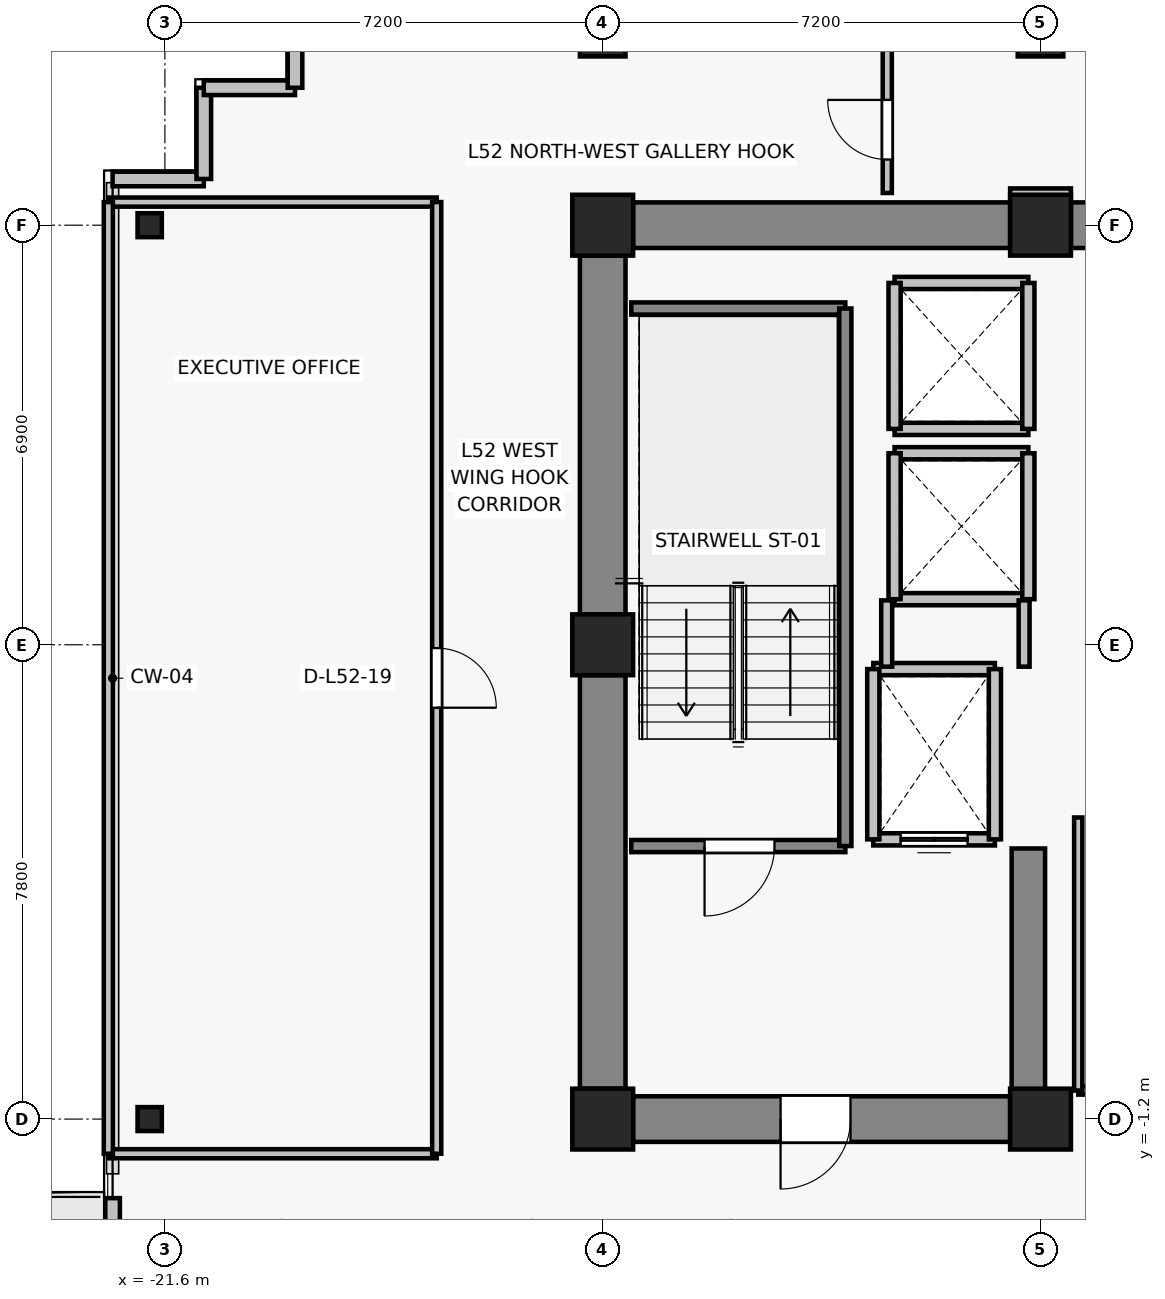
"""IFC4 building model, lengths in metres.
Left out: names, types, materials, properties, quantities, classifications, styles, units other than length and angle.
Written with IfcOpenShell. Run it as: python <this file> out.ifc"""

import sys

from ifc_helpers import new_model, si_unit, direction, frame, frame_2d, origin, origin_2d, place, context, subcontext, project, spatial, rectangle, i_section, extrude, source, transform, mapped, element, fill, save


model = new_model("IFC4")
c1 = context("Model", 3, precision=1e-05, world=origin(), true_north=direction((0.0, 1.0)))
c2 = subcontext(c1, "Body", "Model", "MODEL_VIEW")
j1 = project(units=[si_unit("LENGTHUNIT", "METRE"), si_unit("PLANEANGLEUNIT", "RADIAN")], contexts=[c1])
p1 = place(None, origin())
s1 = spatial("IfcSite", under=j1, at=p1, CompositionType="ELEMENT")
p2 = place(p1, origin())
s2 = spatial("IfcBuilding", under=s1, at=p2, CompositionType="ELEMENT")
p3 = place(p2, frame((0.0, 0.0, 185.8)))
s3 = spatial("IfcBuildingStorey", under=s2, at=p3, CompositionType="ELEMENT", Elevation=185.8)
for number, where, z_axis, x_axis in (
    (1, (-14.4, -1.2, 0.0), (0.0, 0.0, 1.0), (1.0, 0.0, 0.0)),
    (2, (-7.2, -1.2, 0.0), (0.0, 0.0, 1.0), (1.0, 0.0, 0.0)),
    (3, (-14.4, 6.6, 0.0), (0.0, 0.0, 1.0), (1.0, 0.0, 0.0)),
    (4, (-14.4, 13.5, 0.0), (0.0, 0.0, 1.0), (1.0, 0.0, 0.0)),
    (5, (-7.2, 13.5, 0.0), (0.0, 0.0, 1.0), (1.0, 0.0, 0.0)),
):
    element("IfcColumn", number, at=place(p3, frame(where, z_axis=z_axis, x_axis=x_axis)), inside=s3, PredefinedType="COLUMN", context=c2, shape_type="SweptSolid", body=[
        extrude(rectangle(XDim=1.0, YDim=1.0, at=origin_2d()), origin(), (0.0, 0.0, 1.0), 3.3),
    ])
for number, where, z_axis, x_axis in (
    (6, (-14.4, 16.65, 0.0), (0.0, 0.0, 1.0), (1.0, 0.0, 0.0)),
    (7, (-7.2, 16.65, 0.0), (0.0, 0.0, 1.0), (1.0, 0.0, 0.0)),
):
    element("IfcColumn", number, at=place(p3, frame(where, z_axis=z_axis, x_axis=x_axis)), inside=s3, PredefinedType="COLUMN", context=c2, shape_type="SweptSolid", body=[
        extrude(rectangle(XDim=0.75, YDim=0.75, at=origin_2d()), origin(), (0.0, 0.0, 1.0), 3.3),
    ])
for number, where, z_axis, x_axis in (
    (8, (-21.85, -1.2, 0.0), (0.0, 0.0, 1.0), (1.0, 0.0, 0.0)),
    (9, (-21.85, 13.5, 0.0), (0.0, 0.0, 1.0), (1.0, 0.0, 0.0)),
):
    element("IfcColumn", number, at=place(p3, frame(where, z_axis=z_axis, x_axis=x_axis)), inside=s3, PredefinedType="COLUMN", context=c2, shape_type="SweptSolid", body=[
        extrude(i_section(OverallWidth=0.399, OverallDepth=0.394, WebThickness=0.023, FlangeThickness=0.037, FilletRadius=0.015, at=origin_2d()), origin(), (0.0, 0.0, 1.0), 3.3),
    ])
p4 = place(p3, frame((-13.9, 13.5, 0.0), z_axis=(0.0, 0.0, 1.0), x_axis=(1.0, 0.0, 0.0)))
e10 = element("IfcWall", 10, at=p4, inside=s3, PredefinedType="SHEAR", context=c2, shape_type="SweptSolid", body=[
    extrude(rectangle(XDim=6.2, YDim=0.75, at=frame_2d((3.1, 0.0))), origin(), (0.0, 0.0, 1.0), 3.075),
])
p5 = place(p3, frame((-6.7, 13.5, 0.0), z_axis=(0.0, 0.0, 1.0), x_axis=(1.0, 0.0, 0.0)))
e11 = element("IfcWall", 11, at=p5, inside=s3, PredefinedType="SHEAR", context=c2, shape_type="SweptSolid", body=[
    extrude(rectangle(XDim=13.4, YDim=0.75, at=frame_2d((6.7, 0.0))), origin(), (0.0, 0.0, 1.0), 3.075),
])
p6 = place(p3, frame((-14.4, -0.7, 0.0), z_axis=(0.0, 0.0, 1.0), x_axis=(0.0, 1.0, 0.0)))
e12 = element("IfcWall", 12, at=p6, inside=s3, PredefinedType="SHEAR", context=c2, shape_type="SweptSolid", body=[
    extrude(rectangle(XDim=6.8, YDim=0.75, at=frame_2d((3.4, 0.0))), origin(), (0.0, 0.0, 1.0), 3.075),
])
p7 = place(p3, frame((-14.4, 7.1, 0.0), z_axis=(0.0, 0.0, 1.0), x_axis=(0.0, 1.0, 0.0)))
e13 = element("IfcWall", 13, at=p7, inside=s3, PredefinedType="SHEAR", context=c2, shape_type="SweptSolid", body=[
    extrude(rectangle(XDim=5.9, YDim=0.75, at=frame_2d((2.95, 0.0))), origin(), (0.0, 0.0, 1.0), 3.075),
])
p8 = place(p3, frame((-7.7, -1.2, 0.0), z_axis=(0.0, 0.0, 1.0), x_axis=(-1.0, 0.0, 0.0)))
e14 = element("IfcWall", 14, at=p8, inside=s3, PredefinedType="SHEAR", context=c2, shape_type="SweptSolid", body=[
    extrude(rectangle(XDim=6.2, YDim=0.75, at=frame_2d((3.1, 0.0))), origin(), (0.0, 0.0, 1.0), 3.075),
])
p9 = place(p8, frame((2.625, 0.0, 0.0)))
e15 = element("IfcOpeningElement", 15, at=p9, cuts=e14, PredefinedType="OPENING", context=c2, shape_type="SweptSolid", body=[
    extrude(rectangle(XDim=1.15, YDim=2.15, at=frame_2d((0.575, 1.075))), frame((0.0, 0.385, 0.0), z_axis=(0.0, -1.0, 0.0), x_axis=(1.0, 0.0, 0.0)), (0.0, 0.0, 1.0), 0.77),
])
p10 = place(p3, frame((-7.4, -0.825, 0.0), z_axis=(0.0, 0.0, 1.0), x_axis=(0.0, 1.0, 0.0)))
e16 = element("IfcWall", 16, at=p10, inside=s3, PredefinedType="SHEAR", context=c2, shape_type="SweptSolid", body=[
    extrude(rectangle(XDim=4.075, YDim=0.55, at=frame_2d((2.038, 0.0))), origin(), (0.0, 0.0, 1.0), 3.075),
])
p11 = place(p3, frame((-22.46, -8.3, 0.0), z_axis=(0.0, 0.0, 1.0), x_axis=(0.0, 1.0, 0.0)))
e17 = element("IfcWall", 17, at=p11, inside=s3, PredefinedType="SOLIDWALL", context=c2, shape_type="SweptSolid", body=[
    extrude(rectangle(XDim=5.8, YDim=0.24, at=frame_2d((2.9, 0.0))), origin(), (0.0, 0.0, 1.0), 3.075),
])
p12 = place(p11, frame((1.566, 0.0, 0.0)))
e18 = element("IfcOpeningElement", 18, at=p12, cuts=e17, PredefinedType="OPENING", context=c2, shape_type="SweptSolid", body=[
    extrude(rectangle(XDim=1.0, YDim=2.2, at=frame_2d((0.5, 1.1))), frame((0.0, 0.13, 0.0), z_axis=(0.0, -1.0, 0.0), x_axis=(1.0, 0.0, 0.0)), (0.0, 0.0, 1.0), 0.26),
])
p13 = place(p11, frame((2.916, 0.0, 0.85)))
e19 = element("IfcOpeningElement", 19, at=p13, cuts=e17, PredefinedType="OPENING", context=c2, shape_type="SweptSolid", body=[
    extrude(rectangle(XDim=1.2, YDim=1.5, at=frame_2d((0.6, 0.75))), frame((0.0, 0.13, 0.0), z_axis=(0.0, -1.0, 0.0), x_axis=(1.0, 0.0, 0.0)), (0.0, 0.0, 1.0), 0.26),
])
for number, where, z_axis, x_axis in (
    (20, (-20.96, 14.26, 0.0), (0.0, 0.0, 1.0), (-1.0, 0.0, 0.0)),
    (21, (-20.96, 15.76, 0.0), (0.0, 0.0, 1.0), (0.0, -1.0, 0.0)),
    (22, (-19.46, 15.76, 0.0), (0.0, 0.0, 1.0), (-1.0, 0.0, 0.0)),
    (23, (-19.46, 17.26, 0.0), (0.0, 0.0, 1.0), (0.0, -1.0, 0.0)),
):
    element("IfcWall", number, at=place(p3, frame(where, z_axis=z_axis, x_axis=x_axis)), inside=s3, PredefinedType="SOLIDWALL", context=c2, shape_type="SweptSolid", body=[
        extrude(rectangle(XDim=1.5, YDim=0.24, at=frame_2d((0.75, 0.0))), origin(), (0.0, 0.0, 1.0), 3.075),
    ])
p14 = place(p3, frame((-7.95, 3.4, 0.0), z_axis=(0.0, 0.0, 1.0), x_axis=(-1.0, 0.0, 0.0)))
e24 = element("IfcWall", 24, at=p14, inside=s3, PredefinedType="SOLIDWALL", context=c2, shape_type="SweptSolid", body=[
    extrude(rectangle(XDim=2.0, YDim=0.2, at=frame_2d((1.0, 0.0))), origin(), (0.0, 0.0, 1.0), 3.075),
])
p15 = place(p14, frame((0.45, 0.0, 0.0)))
e25 = element("IfcOpeningElement", 25, at=p15, cuts=e24, PredefinedType="OPENING", context=c2, shape_type="SweptSolid", body=[
    extrude(rectangle(XDim=1.1, YDim=2.2, at=frame_2d((0.55, 1.1))), frame((0.0, 0.11, 0.0), z_axis=(0.0, -1.0, 0.0), x_axis=(1.0, 0.0, 0.0)), (0.0, 0.0, 1.0), 0.22),
])
p16 = place(p3, frame((-9.95, 6.2, 0.0), z_axis=(0.0, 0.0, 1.0), x_axis=(1.0, 0.0, 0.0)))
e26 = element("IfcWall", 26, at=p16, inside=s3, PredefinedType="SOLIDWALL", context=c2, shape_type="SweptSolid", body=[
    extrude(rectangle(XDim=2.0, YDim=0.2, at=frame_2d((1.0, 0.0))), origin(), (0.0, 0.0, 1.0), 3.075),
])
for number, where, z_axis, x_axis in (
    (27, (-9.95, 3.4, 0.0), (0.0, 0.0, 1.0), (0.0, 1.0, 0.0)),
    (28, (-7.95, 6.2, 0.0), (0.0, 0.0, 1.0), (0.0, -1.0, 0.0)),
):
    element("IfcWall", number, at=place(p3, frame(where, z_axis=z_axis, x_axis=x_axis)), inside=s3, PredefinedType="SOLIDWALL", context=c2, shape_type="SweptSolid", body=[
        extrude(rectangle(XDim=2.8, YDim=0.2, at=frame_2d((1.4, 0.0))), origin(), (0.0, 0.0, 1.0), 3.075),
    ])
for number, where, z_axis, x_axis in (
    (29, (-7.4, 7.35, 0.0), (0.0, 0.0, 1.0), (-1.0, 0.0, 0.0)),
    (30, (-9.6, 9.75, 0.0), (0.0, 0.0, 1.0), (1.0, 0.0, 0.0)),
):
    element("IfcWall", number, at=place(p3, frame(where, z_axis=z_axis, x_axis=x_axis)), inside=s3, PredefinedType="SOLIDWALL", context=c2, shape_type="SweptSolid", body=[
        extrude(rectangle(XDim=2.2, YDim=0.2, at=frame_2d((1.1, 0.0))), origin(), (0.0, 0.0, 1.0), 2.565),
    ])
p17 = place(p3, frame((-9.6, 7.35, 0.0), z_axis=(0.0, 0.0, 1.0), x_axis=(0.0, 1.0, 0.0)))
e31 = element("IfcWall", 31, at=p17, inside=s3, PredefinedType="SOLIDWALL", context=c2, shape_type="SweptSolid", body=[
    extrude(rectangle(XDim=2.4, YDim=0.2, at=frame_2d((1.2, 0.0))), origin(), (0.0, 0.0, 1.0), 3.075),
])
p18 = place(p3, frame((-7.4, 9.75, 0.0), z_axis=(0.0, 0.0, 1.0), x_axis=(0.0, -1.0, 0.0)))
e32 = element("IfcWall", 32, at=p18, inside=s3, PredefinedType="SOLIDWALL", context=c2, shape_type="SweptSolid", body=[
    extrude(rectangle(XDim=2.4, YDim=0.2, at=frame_2d((1.2, 0.0))), origin(), (0.0, 0.0, 1.0), 2.565),
])
for number, where, z_axis, x_axis in (
    (33, (-7.4, 10.15, 0.0), (0.0, 0.0, 1.0), (-1.0, 0.0, 0.0)),
    (34, (-9.6, 12.55, 0.0), (0.0, 0.0, 1.0), (1.0, 0.0, 0.0)),
):
    element("IfcWall", number, at=place(p3, frame(where, z_axis=z_axis, x_axis=x_axis)), inside=s3, PredefinedType="SOLIDWALL", context=c2, shape_type="SweptSolid", body=[
        extrude(rectangle(XDim=2.2, YDim=0.2, at=frame_2d((1.1, 0.0))), origin(), (0.0, 0.0, 1.0), 2.565),
    ])
p19 = place(p3, frame((-9.6, 10.15, 0.0), z_axis=(0.0, 0.0, 1.0), x_axis=(0.0, 1.0, 0.0)))
e35 = element("IfcWall", 35, at=p19, inside=s3, PredefinedType="SOLIDWALL", context=c2, shape_type="SweptSolid", body=[
    extrude(rectangle(XDim=2.4, YDim=0.2, at=frame_2d((1.2, 0.0))), origin(), (0.0, 0.0, 1.0), 3.075),
])
p20 = place(p3, frame((-7.4, 12.55, 0.0), z_axis=(0.0, 0.0, 1.0), x_axis=(0.0, -1.0, 0.0)))
e36 = element("IfcWall", 36, at=p20, inside=s3, PredefinedType="SOLIDWALL", context=c2, shape_type="SweptSolid", body=[
    extrude(rectangle(XDim=2.4, YDim=0.2, at=frame_2d((1.2, 0.0))), origin(), (0.0, 0.0, 1.0), 2.565),
])
p21 = place(p3, frame((-10.41, 3.29, 0.0), z_axis=(0.0, 0.0, 1.0), x_axis=(-1.0, 0.0, 0.0)))
e37 = element("IfcWall", 37, at=p21, inside=s3, PredefinedType="SOLIDWALL", context=c2, shape_type="SweptSolid", body=[
    extrude(rectangle(XDim=3.52, YDim=0.2, at=frame_2d((1.76, 0.0))), origin(), (0.0, 0.0, 1.0), 3.075),
])
p22 = place(p21, frame((1.165, 0.0, 0.0)))
e38 = element("IfcOpeningElement", 38, at=p22, cuts=e37, PredefinedType="OPENING", context=c2, shape_type="SweptSolid", body=[
    extrude(rectangle(XDim=1.15, YDim=2.15, at=frame_2d((0.575, 1.075))), frame((0.0, 0.11, 0.0), z_axis=(0.0, -1.0, 0.0), x_axis=(1.0, 0.0, 0.0)), (0.0, 0.0, 1.0), 0.22),
])
p23 = place(p3, frame((-13.93, 12.13, 0.0), z_axis=(0.0, 0.0, 1.0), x_axis=(1.0, 0.0, 0.0)))
e39 = element("IfcWall", 39, at=p23, inside=s3, PredefinedType="SOLIDWALL", context=c2, shape_type="SweptSolid", body=[
    extrude(rectangle(XDim=3.52, YDim=0.2, at=frame_2d((1.76, 0.0))), origin(), (0.0, 0.0, 1.0), 3.075),
])
p24 = place(p3, frame((-10.41, 12.13, 0.0), z_axis=(0.0, 0.0, 1.0), x_axis=(0.0, -1.0, 0.0)))
e40 = element("IfcWall", 40, at=p24, inside=s3, PredefinedType="SOLIDWALL", context=c2, shape_type="SweptSolid", body=[
    extrude(rectangle(XDim=8.84, YDim=0.2, at=frame_2d((4.42, 0.0))), origin(), (0.0, 0.0, 1.0), 3.075),
])
p25 = place(p3, frame((-9.73, 6.24, 0.0), z_axis=(0.0, 0.0, 1.0), x_axis=(0.0, 1.0, 0.0)))
e41 = element("IfcWall", 41, at=p25, inside=s3, PredefinedType="PARTITIONING", context=c2, shape_type="SweptSolid", body=[
    extrude(rectangle(XDim=1.09, YDim=0.18, at=frame_2d((0.545, 0.0))), origin(), (0.0, 0.0, 1.0), 3.075),
])
p26 = place(p3, frame((-7.47, 7.33, 0.0), z_axis=(0.0, 0.0, 1.0), x_axis=(0.0, -1.0, 0.0)))
e42 = element("IfcWall", 42, at=p26, inside=s3, PredefinedType="PARTITIONING", context=c2, shape_type="SweptSolid", body=[
    extrude(rectangle(XDim=1.09, YDim=0.18, at=frame_2d((0.545, 0.0))), origin(), (0.0, 0.0, 1.0), 2.565),
])
p27 = place(p3, frame((-1.47, -0.73, 0.0), z_axis=(0.0, 0.0, 1.0), x_axis=(-1.0, 0.0, 0.0)))
e43 = element("IfcWall", 43, at=p27, inside=s3, PredefinedType="PARTITIONING", context=c2, shape_type="SweptSolid", body=[
    extrude(rectangle(XDim=5.11, YDim=0.135, at=frame_2d((2.555, 0.0))), origin(), (0.0, 0.0, 1.0), 3.075),
])
p28 = place(p3, frame((-6.58, -0.73, 0.0), z_axis=(0.0, 0.0, 1.0), x_axis=(0.0, 1.0, 0.0)))
e44 = element("IfcWall", 44, at=p28, inside=s3, PredefinedType="PARTITIONING", context=c2, shape_type="SweptSolid", body=[
    extrude(rectangle(XDim=4.49, YDim=0.135, at=frame_2d((2.245, 0.0))), origin(), (0.0, 0.0, 1.0), 3.075),
])
p29 = place(p3, frame((-17.13, -1.77, 0.0), z_axis=(0.0, 0.0, 1.0), x_axis=(-1.0, 0.0, 0.0)))
e45 = element("IfcWall", 45, at=p29, inside=s3, PredefinedType="PARTITIONING", context=c2, shape_type="SweptSolid", body=[
    extrude(rectangle(XDim=5.4, YDim=0.15, at=frame_2d((2.7, 0.0))), origin(), (0.0, 0.0, 1.0), 2.565),
])
p30 = place(p3, frame((-22.53, 13.88, 0.0), z_axis=(0.0, 0.0, 1.0), x_axis=(1.0, 0.0, 0.0)))
e46 = element("IfcWall", 46, at=p30, inside=s3, PredefinedType="PARTITIONING", context=c2, shape_type="SweptSolid", body=[
    extrude(rectangle(XDim=5.4, YDim=0.15, at=frame_2d((2.7, 0.0))), origin(), (0.0, 0.0, 1.0), 3.075),
])
p31 = place(p3, frame((-22.53, -1.77, 0.0), z_axis=(0.0, 0.0, 1.0), x_axis=(0.0, 1.0, 0.0)))
e47 = element("IfcWall", 47, at=p31, inside=s3, PredefinedType="PARTITIONING", context=c2, shape_type="SweptSolid", body=[
    extrude(rectangle(XDim=15.65, YDim=0.15, at=frame_2d((7.825, 0.0))), origin(), (0.0, 0.0, 1.0), 3.075),
])
p32 = place(p3, frame((-17.13, 13.88, 0.0), z_axis=(0.0, 0.0, 1.0), x_axis=(0.0, -1.0, 0.0)))
e48 = element("IfcWall", 48, at=p32, inside=s3, PredefinedType="PARTITIONING", context=c2, shape_type="SweptSolid", body=[
    extrude(rectangle(XDim=15.65, YDim=0.15, at=frame_2d((7.825, 0.0))), origin(), (0.0, 0.0, 1.0), 2.565),
])
p33 = place(p32, frame((7.335, 0.0, 0.0)))
e49 = element("IfcOpeningElement", 49, at=p33, cuts=e48, PredefinedType="OPENING", context=c2, shape_type="SweptSolid", body=[
    extrude(rectangle(XDim=0.98, YDim=2.15, at=frame_2d((0.49, 1.075))), frame((0.0, 0.085, 0.0), z_axis=(0.0, -1.0, 0.0), x_axis=(1.0, 0.0, 0.0)), (0.0, 0.0, 1.0), 0.17),
])
p34 = place(p3, frame((-6.7, 14.03, 0.0), z_axis=(0.0, 0.0, 1.0), x_axis=(-1.0, 0.0, 0.0)))
e50 = element("IfcWall", 50, at=p34, inside=s3, PredefinedType="PARTITIONING", context=c2, shape_type="SweptSolid", body=[
    extrude(rectangle(XDim=1.0, YDim=0.15, at=frame_2d((0.5, 0.0))), origin(), (0.0, 0.0, 1.0), 2.565),
])
p35 = place(p3, frame((-9.72, 14.03, 0.0), z_axis=(0.0, 0.0, 1.0), x_axis=(0.0, 1.0, 0.0)))
e51 = element("IfcWall", 51, at=p35, inside=s3, PredefinedType="PARTITIONING", context=c2, shape_type="SweptSolid", body=[
    extrude(rectangle(XDim=3.3, YDim=0.15, at=frame_2d((1.65, 0.0))), origin(), (0.0, 0.0, 1.0), 2.565),
])
p36 = place(p35, frame((0.55, 0.0, 0.0)))
e52 = element("IfcOpeningElement", 52, at=p36, cuts=e51, PredefinedType="OPENING", context=c2, shape_type="SweptSolid", body=[
    extrude(rectangle(XDim=0.98, YDim=2.15, at=frame_2d((0.49, 1.075))), frame((0.0, 0.085, 0.0), z_axis=(0.0, -1.0, 0.0), x_axis=(1.0, 0.0, 0.0)), (0.0, 0.0, 1.0), 0.17),
])
m1 = source(origin(), c2, "Body", "SweptSolid", [
    extrude(rectangle(XDim=1.1, YDim=2.2, at=frame_2d((0.55, 1.1))), frame((0.0, 0.025, 0.0), z_axis=(0.0, -1.0, 0.0), x_axis=(1.0, 0.0, 0.0)), (0.0, 0.0, 1.0), 0.05),
])
p37 = place(p15, origin())
e53 = element("IfcDoor", 53, at=p37, inside=s3, OperationType="DOUBLE_DOOR_SLIDING", PredefinedType="DOOR", context=c2, shape_type="MappedRepresentation", body=[
    mapped(m1, transform((0.0, 0.0, 0.0), x_axis=(1.0, 0.0, 0.0), y_axis=(0.0, 1.0, 0.0), z_axis=(0.0, 0.0, 1.0), scale=1.0)),
])
fill(e25, e53)
m2 = source(origin(), c2, "Body", "SweptSolid", [
    extrude(rectangle(XDim=1.15, YDim=2.15, at=frame_2d((0.575, 1.075))), frame((0.0, 0.025, 0.0), z_axis=(0.0, -1.0, 0.0), x_axis=(1.0, 0.0, 0.0)), (0.0, 0.0, 1.0), 0.05),
])
p38 = place(p22, origin())
e54 = element("IfcDoor", 54, at=p38, inside=s3, OperationType="SINGLE_SWING_RIGHT", PredefinedType="DOOR", context=c2, shape_type="MappedRepresentation", body=[
    mapped(m2, transform((0.0, 0.0, 0.0), x_axis=(1.0, 0.0, 0.0), y_axis=(0.0, 1.0, 0.0), z_axis=(0.0, 0.0, 1.0), scale=1.0)),
])
fill(e38, e54)
p39 = place(p9, origin())
e55 = element("IfcDoor", 55, at=p39, inside=s3, OperationType="SINGLE_SWING_RIGHT", PredefinedType="DOOR", context=c2, shape_type="MappedRepresentation", body=[
    mapped(m2, transform((0.0, 0.0, 0.0), x_axis=(1.0, 0.0, 0.0), y_axis=(0.0, 1.0, 0.0), z_axis=(0.0, 0.0, 1.0), scale=1.0)),
])
fill(e15, e55)
m3 = source(origin(), c2, "Body", "SweptSolid", [
    extrude(rectangle(XDim=0.98, YDim=2.15, at=frame_2d((0.49, 1.075))), frame((0.0, 0.025, 0.0), z_axis=(0.0, -1.0, 0.0), x_axis=(1.0, 0.0, 0.0)), (0.0, 0.0, 1.0), 0.05),
])
p40 = place(p33, origin())
e56 = element("IfcDoor", 56, at=p40, inside=s3, OperationType="SINGLE_SWING_RIGHT", PredefinedType="DOOR", context=c2, shape_type="MappedRepresentation", body=[
    mapped(m3, transform((0.0, 0.0, 0.0), x_axis=(1.0, 0.0, 0.0), y_axis=(0.0, 1.0, 0.0), z_axis=(0.0, 0.0, 1.0), scale=1.0)),
])
fill(e49, e56)
p41 = place(p36, origin())
e57 = element("IfcDoor", 57, at=p41, inside=s3, OperationType="SINGLE_SWING_RIGHT", PredefinedType="DOOR", context=c2, shape_type="MappedRepresentation", body=[
    mapped(m3, transform((0.0, 0.0, 0.0), x_axis=(1.0, 0.0, 0.0), y_axis=(0.0, 1.0, 0.0), z_axis=(0.0, 0.0, 1.0), scale=1.0)),
])
fill(e52, e57)
save(model, sys.argv[1])
